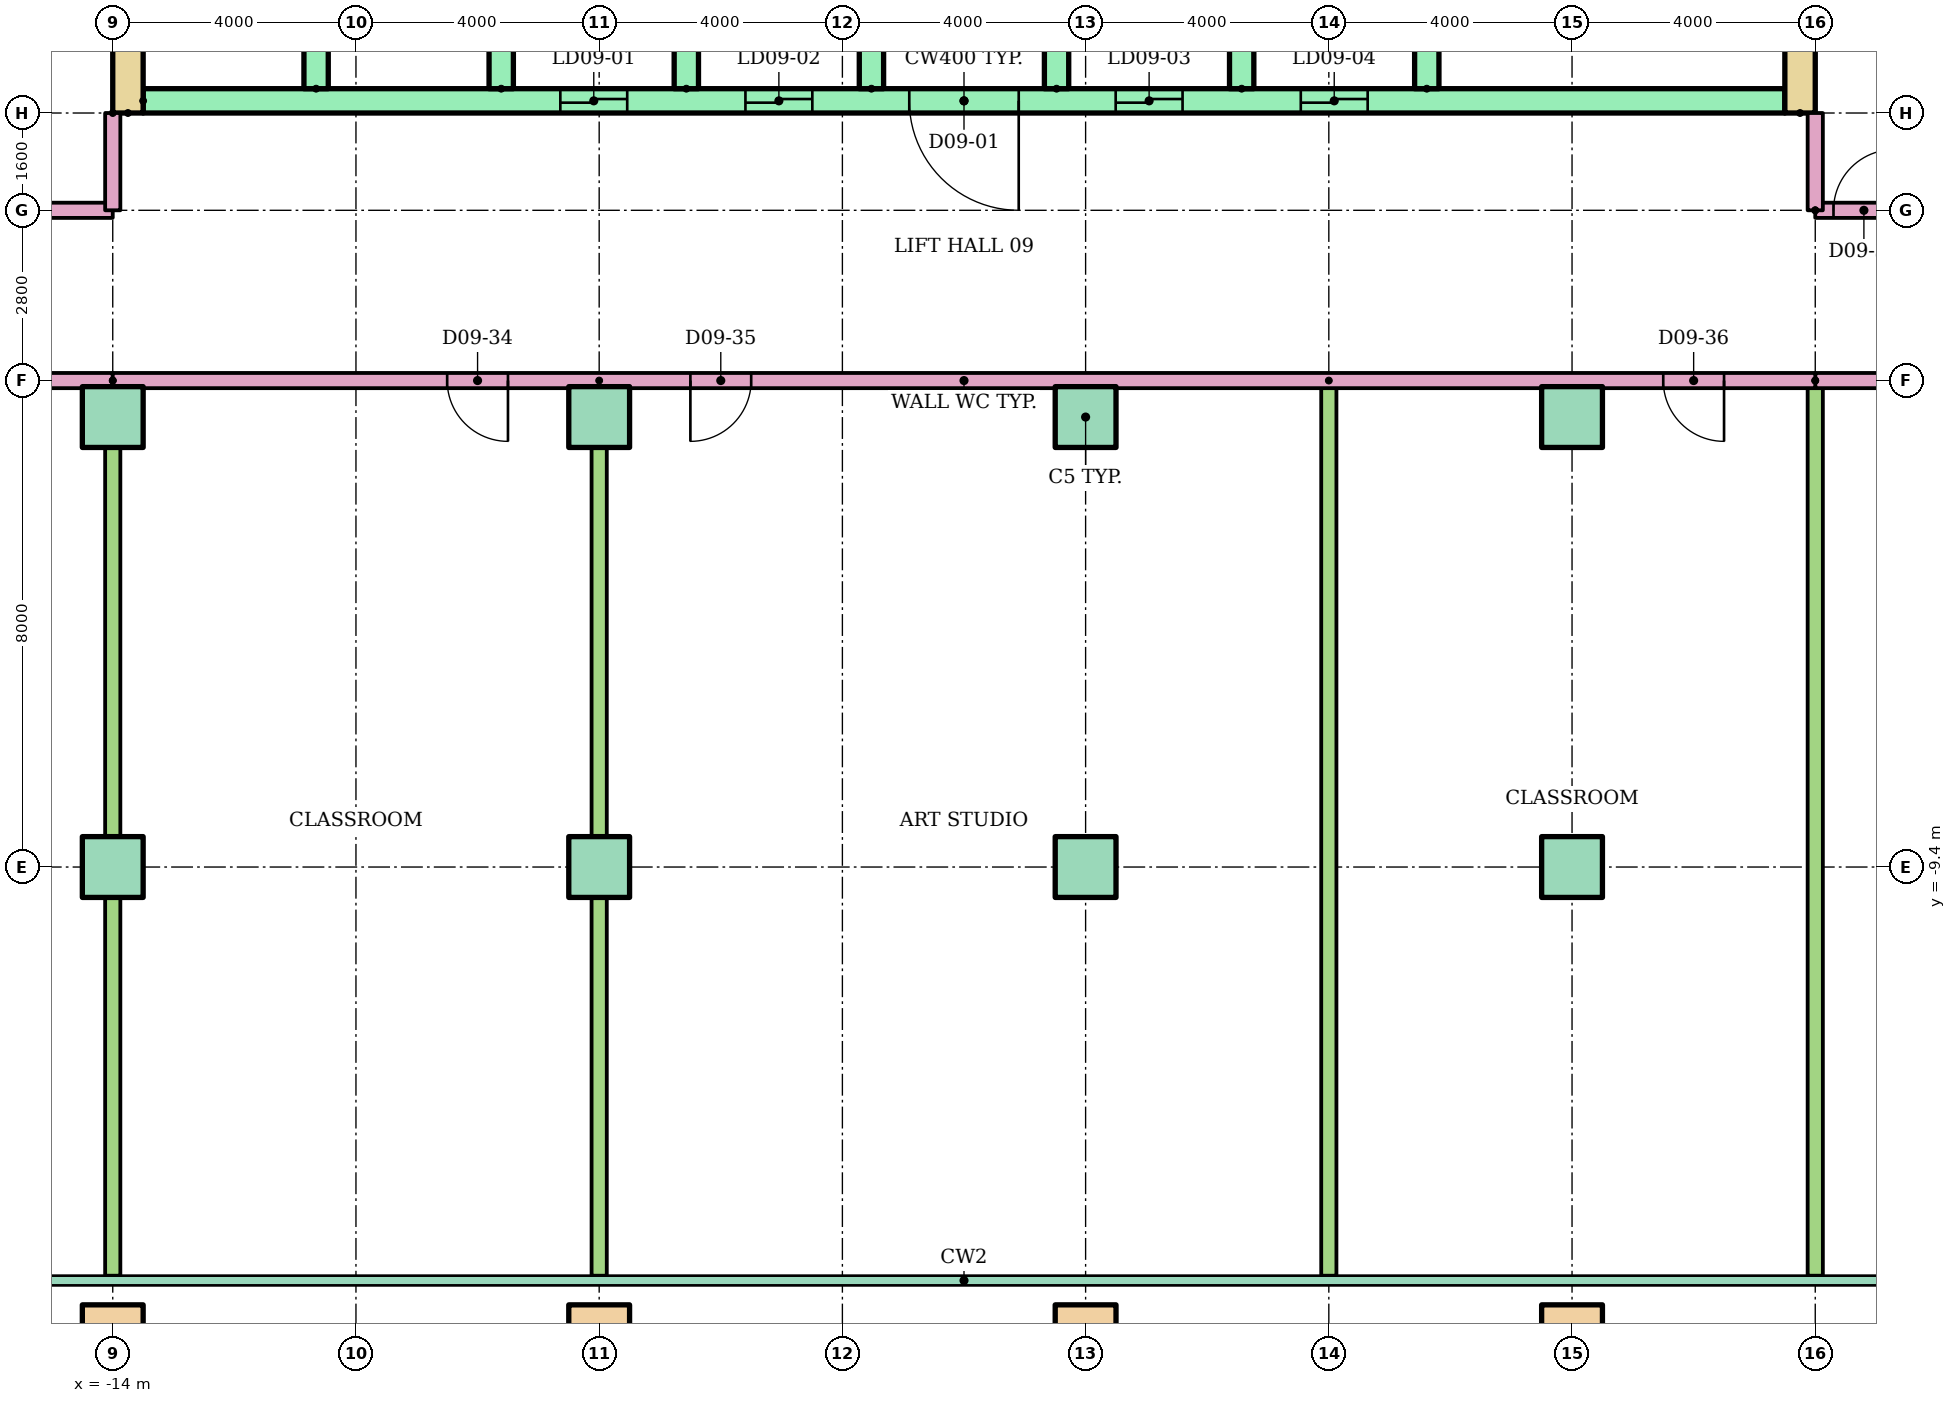
"""IFC4 building model, lengths in metres.
Left out: names, types, materials, properties, quantities, classifications, styles, units other than length and angle.
Written with IfcOpenShell. Run it as: python <this file> out.ifc"""

import sys

from ifc_helpers import new_model, si_unit, direction, frame, frame_2d, origin, origin_2d, place, context, subcontext, project, spatial, rectangle, hollow_rectangle, extrude, element, fill, save


model = new_model("IFC4")
c1 = context("Model", 3, precision=1e-05, world=origin(), true_north=direction((0.0, 1.0)))
c2 = subcontext(c1, "Body", "Model", "MODEL_VIEW")
j1 = project(units=[si_unit("LENGTHUNIT", "METRE"), si_unit("PLANEANGLEUNIT", "RADIAN")], contexts=[c1])
p1 = place(None, origin())
s1 = spatial("IfcSite", under=j1, at=p1, CompositionType="ELEMENT")
p2 = place(p1, origin())
s2 = spatial("IfcBuilding", under=s1, at=p2, CompositionType="ELEMENT")
p3 = place(p2, frame((0.0, 0.0, 37.7)))
s3 = spatial("IfcBuildingStorey", under=s2, at=p3, CompositionType="ELEMENT", Elevation=37.7)
for number, where in (
    (1, (-14.0, -17.1, 0.0)),
    (2, (-6.0, -17.1, 0.0)),
    (3, (2.0, -17.1, 0.0)),
    (4, (10.0, -17.1, 0.0)),
):
    element("IfcColumn", number, at=place(p3, frame(where)), inside=s3, PredefinedType="COLUMN", context=c2, shape_type="SweptSolid", body=[
        extrude(hollow_rectangle(XDim=1.0, YDim=1.0, WallThickness=0.05, at=origin_2d()), origin(), (0.0, 0.0, 1.0), 3.9),
    ])
for number, where in (
    (5, (-14.0, -9.4, 0.0)),
    (6, (-6.0, -9.4, 0.0)),
    (7, (2.0, -9.4, 0.0)),
    (8, (10.0, -9.4, 0.0)),
    (9, (-14.0, -2.0, 0.0)),
    (10, (-6.0, -2.0, 0.0)),
    (11, (2.0, -2.0, 0.0)),
    (12, (10.0, -2.0, 0.0)),
):
    element("IfcColumn", number, at=place(p3, frame(where)), inside=s3, PredefinedType="COLUMN", context=c2, shape_type="SweptSolid", body=[
        extrude(rectangle(XDim=1.0, YDim=1.0, at=origin_2d()), origin(), (0.0, 0.0, 1.0), 3.9),
    ])
for number, where, z_axis, x_axis in (
    (13, (-13.75, 3.0, 0.0), (0.0, 0.0, 1.0), (0.0, 1.0, 0.0)),
    (14, (13.75, 3.0, 0.0), (0.0, 0.0, 1.0), (0.0, 1.0, 0.0)),
):
    element("IfcWall", number, at=place(p3, frame(where, z_axis=z_axis, x_axis=x_axis)), inside=s3, PredefinedType="SHEAR", context=c2, shape_type="SweptSolid", body=[
        extrude(rectangle(XDim=17.0, YDim=0.5, at=frame_2d((8.5, 0.0))), origin(), (0.0, 0.0, 1.0), 3.62),
    ])
p4 = place(p3, frame((-13.5, 3.2, 0.0)))
e15 = element("IfcWall", 15, at=p4, inside=s3, PredefinedType="SHEAR", context=c2, shape_type="SweptSolid", body=[
    extrude(rectangle(XDim=27.0, YDim=0.4, at=frame_2d((13.5, 0.0))), origin(), (0.0, 0.0, 1.0), 3.62),
])
p5 = place(p4, frame((6.861, 0.0, 0.0)))
e16 = element("IfcOpeningElement", 16, at=p5, cuts=e15, PredefinedType="OPENING", context=c2, shape_type="SweptSolid", body=[
    extrude(rectangle(XDim=1.1, YDim=2.1, at=frame_2d((0.55, 1.05))), frame((0.0, 0.21, 0.0), z_axis=(0.0, -1.0, 0.0), x_axis=(1.0, 0.0, 0.0)), (0.0, 0.0, 1.0), 0.42),
])
p6 = place(p4, frame((9.906, 0.0, 0.0)))
e17 = element("IfcOpeningElement", 17, at=p6, cuts=e15, PredefinedType="OPENING", context=c2, shape_type="SweptSolid", body=[
    extrude(rectangle(XDim=1.1, YDim=2.1, at=frame_2d((0.55, 1.05))), frame((0.0, 0.21, 0.0), z_axis=(0.0, -1.0, 0.0), x_axis=(1.0, 0.0, 0.0)), (0.0, 0.0, 1.0), 0.42),
])
p7 = place(p4, frame((15.994, 0.0, 0.0)))
e18 = element("IfcOpeningElement", 18, at=p7, cuts=e15, PredefinedType="OPENING", context=c2, shape_type="SweptSolid", body=[
    extrude(rectangle(XDim=1.1, YDim=2.1, at=frame_2d((0.55, 1.05))), frame((0.0, 0.21, 0.0), z_axis=(0.0, -1.0, 0.0), x_axis=(1.0, 0.0, 0.0)), (0.0, 0.0, 1.0), 0.42),
])
p8 = place(p4, frame((19.039, 0.0, 0.0)))
e19 = element("IfcOpeningElement", 19, at=p8, cuts=e15, PredefinedType="OPENING", context=c2, shape_type="SweptSolid", body=[
    extrude(rectangle(XDim=1.1, YDim=2.1, at=frame_2d((0.55, 1.05))), frame((0.0, 0.21, 0.0), z_axis=(0.0, -1.0, 0.0), x_axis=(1.0, 0.0, 0.0)), (0.0, 0.0, 1.0), 0.42),
])
p9 = place(p4, frame((12.6, 0.0, 0.0)))
e20 = element("IfcOpeningElement", 20, at=p9, cuts=e15, PredefinedType="OPENING", context=c2, shape_type="SweptSolid", body=[
    extrude(rectangle(XDim=1.8, YDim=2.1, at=frame_2d((0.9, 1.05))), frame((0.0, 0.21, 0.0), z_axis=(0.0, -1.0, 0.0), x_axis=(1.0, 0.0, 0.0)), (0.0, 0.0, 1.0), 0.42),
])
for number, where, z_axis, x_axis in (
    (21, (-10.656, 3.4, 0.0), (0.0, 0.0, 1.0), (0.0, 1.0, 0.0)),
    (22, (-7.611, 3.4, 0.0), (0.0, 0.0, 1.0), (0.0, 1.0, 0.0)),
    (23, (-4.567, 3.4, 0.0), (0.0, 0.0, 1.0), (0.0, 1.0, 0.0)),
    (24, (-1.522, 3.4, 0.0), (0.0, 0.0, 1.0), (0.0, 1.0, 0.0)),
    (25, (1.522, 3.4, 0.0), (0.0, 0.0, 1.0), (0.0, 1.0, 0.0)),
    (26, (4.567, 3.4, 0.0), (0.0, 0.0, 1.0), (0.0, 1.0, 0.0)),
    (27, (7.611, 3.4, 0.0), (0.0, 0.0, 1.0), (0.0, 1.0, 0.0)),
):
    element("IfcWall", number, at=place(p3, frame(where, z_axis=z_axis, x_axis=x_axis)), inside=s3, PredefinedType="SHEAR", context=c2, shape_type="SweptSolid", body=[
        extrude(rectangle(XDim=3.0, YDim=0.4, at=frame_2d((1.5, 0.0))), origin(), (0.0, 0.0, 1.0), 3.62),
    ])
p10 = place(p3, frame((-14.0, -1.4, 0.0), z_axis=(0.0, 0.0, 1.0), x_axis=(-1.0, 0.0, 0.0)))
e28 = element("IfcWall", 28, at=p10, inside=s3, PredefinedType="PARTITIONING", context=c2, shape_type="SweptSolid", body=[
    extrude(rectangle(XDim=15.0, YDim=0.25, at=frame_2d((7.5, 0.0))), origin(), (0.0, 0.0, 1.0), 3.1),
])
p11 = place(p10, frame((1.5, 0.0, 0.0)))
e29 = element("IfcOpeningElement", 29, at=p11, cuts=e28, PredefinedType="OPENING", context=c2, shape_type="SweptSolid", body=[
    extrude(rectangle(XDim=1.0, YDim=2.1, at=frame_2d((0.5, 1.05))), frame((0.0, 0.135, 0.0), z_axis=(0.0, -1.0, 0.0), x_axis=(1.0, 0.0, 0.0)), (0.0, 0.0, 1.0), 0.27),
])
p12 = place(p10, frame((8.555, 0.0, 0.0)))
e30 = element("IfcOpeningElement", 30, at=p12, cuts=e28, PredefinedType="OPENING", context=c2, shape_type="SweptSolid", body=[
    extrude(rectangle(XDim=0.9, YDim=2.1, at=frame_2d((0.45, 1.05))), frame((0.0, 0.135, 0.0), z_axis=(0.0, -1.0, 0.0), x_axis=(1.0, 0.0, 0.0)), (0.0, 0.0, 1.0), 0.27),
])
p13 = place(p10, frame((13.5, 0.0, 0.0)))
e31 = element("IfcOpeningElement", 31, at=p13, cuts=e28, PredefinedType="OPENING", context=c2, shape_type="SweptSolid", body=[
    extrude(rectangle(XDim=1.0, YDim=2.1, at=frame_2d((0.5, 1.05))), frame((0.0, 0.135, 0.0), z_axis=(0.0, -1.0, 0.0), x_axis=(1.0, 0.0, 0.0)), (0.0, 0.0, 1.0), 0.27),
])
p14 = place(p3, frame((-14.0, -1.4, 0.0), z_axis=(0.0, 0.0, 1.0), x_axis=(0.0, -1.0, 0.0)))
e32 = element("IfcWall", 32, at=p14, inside=s3, PredefinedType="PARTITIONING", context=c2, shape_type="SweptSolid", body=[
    extrude(rectangle(XDim=14.721, YDim=0.25, at=frame_2d((7.361, 0.0))), origin(), (0.0, 0.0, 1.0), 3.1),
])
p15 = place(p3, frame((-29.0, 1.4, 0.0)))
e33 = element("IfcWall", 33, at=p15, inside=s3, PredefinedType="PARTITIONING", context=c2, shape_type="SweptSolid", body=[
    extrude(rectangle(XDim=15.0, YDim=0.25, at=frame_2d((7.5, 0.0))), origin(), (0.0, 0.0, 1.0), 3.1),
])
p16 = place(p15, frame((12.5, 0.0, 0.0)))
e34 = element("IfcOpeningElement", 34, at=p16, cuts=e33, PredefinedType="OPENING", context=c2, shape_type="SweptSolid", body=[
    extrude(rectangle(XDim=1.0, YDim=2.1, at=frame_2d((0.5, 1.05))), frame((0.0, 0.135, 0.0), z_axis=(0.0, -1.0, 0.0), x_axis=(1.0, 0.0, 0.0)), (0.0, 0.0, 1.0), 0.27),
])
p17 = place(p15, frame((4.5, 0.0, 0.0)))
e35 = element("IfcOpeningElement", 35, at=p17, cuts=e33, PredefinedType="OPENING", context=c2, shape_type="SweptSolid", body=[
    extrude(rectangle(XDim=1.0, YDim=2.1, at=frame_2d((0.5, 1.05))), frame((0.0, 0.135, 0.0), z_axis=(0.0, -1.0, 0.0), x_axis=(1.0, 0.0, 0.0)), (0.0, 0.0, 1.0), 0.27),
])
p18 = place(p3, frame((29.0, -1.4, 0.0), z_axis=(0.0, 0.0, 1.0), x_axis=(-1.0, 0.0, 0.0)))
e36 = element("IfcWall", 36, at=p18, inside=s3, PredefinedType="PARTITIONING", context=c2, shape_type="SweptSolid", body=[
    extrude(rectangle(XDim=15.0, YDim=0.25, at=frame_2d((7.5, 0.0))), origin(), (0.0, 0.0, 1.0), 3.1),
])
p19 = place(p18, frame((12.5, 0.0, 0.0)))
e37 = element("IfcOpeningElement", 37, at=p19, cuts=e36, PredefinedType="OPENING", context=c2, shape_type="SweptSolid", body=[
    extrude(rectangle(XDim=1.0, YDim=2.1, at=frame_2d((0.5, 1.05))), frame((0.0, 0.135, 0.0), z_axis=(0.0, -1.0, 0.0), x_axis=(1.0, 0.0, 0.0)), (0.0, 0.0, 1.0), 0.27),
])
p20 = place(p18, frame((0.5, 0.0, 0.0)))
e38 = element("IfcOpeningElement", 38, at=p20, cuts=e36, PredefinedType="OPENING", context=c2, shape_type="SweptSolid", body=[
    extrude(rectangle(XDim=1.0, YDim=2.1, at=frame_2d((0.5, 1.05))), frame((0.0, 0.135, 0.0), z_axis=(0.0, -1.0, 0.0), x_axis=(1.0, 0.0, 0.0)), (0.0, 0.0, 1.0), 0.27),
])
p21 = place(p3, frame((14.0, -1.4, 0.0), z_axis=(0.0, 0.0, 1.0), x_axis=(0.0, -1.0, 0.0)))
e39 = element("IfcWall", 39, at=p21, inside=s3, PredefinedType="PARTITIONING", context=c2, shape_type="SweptSolid", body=[
    extrude(rectangle(XDim=14.721, YDim=0.25, at=frame_2d((7.361, 0.0))), origin(), (0.0, 0.0, 1.0), 3.1),
])
p22 = place(p3, frame((14.0, 1.4, 0.0)))
e40 = element("IfcWall", 40, at=p22, inside=s3, PredefinedType="PARTITIONING", context=c2, shape_type="SweptSolid", body=[
    extrude(rectangle(XDim=15.0, YDim=0.25, at=frame_2d((7.5, 0.0))), origin(), (0.0, 0.0, 1.0), 3.1),
])
p23 = place(p22, frame((0.3, 0.0, 0.0)))
e41 = element("IfcOpeningElement", 41, at=p23, cuts=e40, PredefinedType="OPENING", context=c2, shape_type="SweptSolid", body=[
    extrude(rectangle(XDim=1.0, YDim=2.1, at=frame_2d((0.5, 1.05))), frame((0.0, 0.135, 0.0), z_axis=(0.0, -1.0, 0.0), x_axis=(1.0, 0.0, 0.0)), (0.0, 0.0, 1.0), 0.27),
])
p24 = place(p22, frame((9.5, 0.0, 0.0)))
e42 = element("IfcOpeningElement", 42, at=p24, cuts=e40, PredefinedType="OPENING", context=c2, shape_type="SweptSolid", body=[
    extrude(rectangle(XDim=1.0, YDim=2.1, at=frame_2d((0.5, 1.05))), frame((0.0, 0.135, 0.0), z_axis=(0.0, -1.0, 0.0), x_axis=(1.0, 0.0, 0.0)), (0.0, 0.0, 1.0), 0.27),
])
p25 = place(p22, frame((13.5, 0.0, 0.0)))
e43 = element("IfcOpeningElement", 43, at=p25, cuts=e40, PredefinedType="OPENING", context=c2, shape_type="SweptSolid", body=[
    extrude(rectangle(XDim=1.0, YDim=2.1, at=frame_2d((0.5, 1.05))), frame((0.0, 0.135, 0.0), z_axis=(0.0, -1.0, 0.0), x_axis=(1.0, 0.0, 0.0)), (0.0, 0.0, 1.0), 0.27),
])
for number, where, z_axis, x_axis in (
    (44, (-6.0, -1.4, 0.0), (0.0, 0.0, 1.0), (0.0, -1.0, 0.0)),
    (45, (6.0, -1.4, 0.0), (0.0, 0.0, 1.0), (0.0, -1.0, 0.0)),
):
    element("IfcWall", number, at=place(p3, frame(where, z_axis=z_axis, x_axis=x_axis)), inside=s3, PredefinedType="PARTITIONING", context=c2, shape_type="SweptSolid", body=[
        extrude(rectangle(XDim=14.721, YDim=0.25, at=frame_2d((7.361, 0.0))), origin(), (0.0, 0.0, 1.0), 3.1),
    ])
p26 = place(p3, frame((14.0, -1.4, 0.0), z_axis=(0.0, 0.0, 1.0), x_axis=(-1.0, 0.0, 0.0)))
e46 = element("IfcWall", 46, at=p26, inside=s3, PredefinedType="PARTITIONING", context=c2, shape_type="SweptSolid", body=[
    extrude(rectangle(XDim=28.0, YDim=0.25, at=frame_2d((14.0, 0.0))), origin(), (0.0, 0.0, 1.0), 3.1),
])
p27 = place(p26, frame((21.5, 0.0, 0.0)))
e47 = element("IfcOpeningElement", 47, at=p27, cuts=e46, PredefinedType="OPENING", context=c2, shape_type="SweptSolid", body=[
    extrude(rectangle(XDim=1.0, YDim=2.1, at=frame_2d((0.5, 1.05))), frame((0.0, 0.135, 0.0), z_axis=(0.0, -1.0, 0.0), x_axis=(1.0, 0.0, 0.0)), (0.0, 0.0, 1.0), 0.27),
])
p28 = place(p26, frame((17.5, 0.0, 0.0)))
e48 = element("IfcOpeningElement", 48, at=p28, cuts=e46, PredefinedType="OPENING", context=c2, shape_type="SweptSolid", body=[
    extrude(rectangle(XDim=1.0, YDim=2.1, at=frame_2d((0.5, 1.05))), frame((0.0, 0.135, 0.0), z_axis=(0.0, -1.0, 0.0), x_axis=(1.0, 0.0, 0.0)), (0.0, 0.0, 1.0), 0.27),
])
p29 = place(p26, frame((1.5, 0.0, 0.0)))
e49 = element("IfcOpeningElement", 49, at=p29, cuts=e46, PredefinedType="OPENING", context=c2, shape_type="SweptSolid", body=[
    extrude(rectangle(XDim=1.0, YDim=2.1, at=frame_2d((0.5, 1.05))), frame((0.0, 0.135, 0.0), z_axis=(0.0, -1.0, 0.0), x_axis=(1.0, 0.0, 0.0)), (0.0, 0.0, 1.0), 0.27),
])
for number, where, z_axis, x_axis in (
    (50, (-14.0, 3.0, 0.0), (0.0, 0.0, 1.0), (0.0, -1.0, 0.0)),
    (51, (14.0, 1.4, 0.0), (0.0, 0.0, 1.0), (0.0, 1.0, 0.0)),
):
    element("IfcWall", number, at=place(p3, frame(where, z_axis=z_axis, x_axis=x_axis)), inside=s3, PredefinedType="PARTITIONING", context=c2, shape_type="SweptSolid", body=[
        extrude(rectangle(XDim=1.6, YDim=0.25, at=frame_2d((0.8, 0.0))), origin(), (0.0, 0.0, 1.0), 3.1),
    ])
p30 = place(p5, origin())
e52 = element("IfcDoor", 52, at=p30, inside=s3, OperationType="SLIDING_TO_LEFT", PredefinedType="DOOR", context=c2, shape_type="SweptSolid", body=[
    extrude(rectangle(XDim=1.1, YDim=2.1, at=frame_2d((0.55, 1.05))), frame((0.0, 0.025, 0.0), z_axis=(0.0, -1.0, 0.0), x_axis=(1.0, 0.0, 0.0)), (0.0, 0.0, 1.0), 0.05),
])
fill(e16, e52)
p31 = place(p6, origin())
e53 = element("IfcDoor", 53, at=p31, inside=s3, OperationType="SLIDING_TO_LEFT", PredefinedType="DOOR", context=c2, shape_type="SweptSolid", body=[
    extrude(rectangle(XDim=1.1, YDim=2.1, at=frame_2d((0.55, 1.05))), frame((0.0, 0.025, 0.0), z_axis=(0.0, -1.0, 0.0), x_axis=(1.0, 0.0, 0.0)), (0.0, 0.0, 1.0), 0.05),
])
fill(e17, e53)
p32 = place(p7, origin())
e54 = element("IfcDoor", 54, at=p32, inside=s3, OperationType="SLIDING_TO_LEFT", PredefinedType="DOOR", context=c2, shape_type="SweptSolid", body=[
    extrude(rectangle(XDim=1.1, YDim=2.1, at=frame_2d((0.55, 1.05))), frame((0.0, 0.025, 0.0), z_axis=(0.0, -1.0, 0.0), x_axis=(1.0, 0.0, 0.0)), (0.0, 0.0, 1.0), 0.05),
])
fill(e18, e54)
p33 = place(p8, origin())
e55 = element("IfcDoor", 55, at=p33, inside=s3, OperationType="SLIDING_TO_LEFT", PredefinedType="DOOR", context=c2, shape_type="SweptSolid", body=[
    extrude(rectangle(XDim=1.1, YDim=2.1, at=frame_2d((0.55, 1.05))), frame((0.0, 0.025, 0.0), z_axis=(0.0, -1.0, 0.0), x_axis=(1.0, 0.0, 0.0)), (0.0, 0.0, 1.0), 0.05),
])
fill(e19, e55)
p34 = place(p9, frame((1.8, 0.0, 0.0), z_axis=(0.0, 0.0, 1.0), x_axis=(-1.0, 0.0, 0.0)))
e56 = element("IfcDoor", 56, at=p34, inside=s3, OperationType="DOUBLE_DOOR_SINGLE_SWING", PredefinedType="DOOR", context=c2, shape_type="SweptSolid", body=[
    extrude(rectangle(XDim=1.8, YDim=2.1, at=frame_2d((0.9, 1.05))), frame((0.0, 0.025, 0.0), z_axis=(0.0, -1.0, 0.0), x_axis=(1.0, 0.0, 0.0)), (0.0, 0.0, 1.0), 0.05),
])
fill(e20, e56)
p35 = place(p23, origin())
e57 = element("IfcDoor", 57, at=p35, inside=s3, OperationType="SINGLE_SWING_RIGHT", PredefinedType="DOOR", context=c2, shape_type="SweptSolid", body=[
    extrude(rectangle(XDim=1.0, YDim=2.1, at=frame_2d((0.5, 1.05))), frame((0.0, 0.025, 0.0), z_axis=(0.0, -1.0, 0.0), x_axis=(1.0, 0.0, 0.0)), (0.0, 0.0, 1.0), 0.05),
])
fill(e41, e57)
p36 = place(p27, origin())
e58 = element("IfcDoor", 58, at=p36, inside=s3, OperationType="SINGLE_SWING_LEFT", PredefinedType="DOOR", context=c2, shape_type="SweptSolid", body=[
    extrude(rectangle(XDim=1.0, YDim=2.1, at=frame_2d((0.5, 1.05))), frame((0.0, 0.025, 0.0), z_axis=(0.0, -1.0, 0.0), x_axis=(1.0, 0.0, 0.0)), (0.0, 0.0, 1.0), 0.05),
])
fill(e47, e58)
p37 = place(p28, origin())
e59 = element("IfcDoor", 59, at=p37, inside=s3, OperationType="SINGLE_SWING_RIGHT", PredefinedType="DOOR", context=c2, shape_type="SweptSolid", body=[
    extrude(rectangle(XDim=1.0, YDim=2.1, at=frame_2d((0.5, 1.05))), frame((0.0, 0.025, 0.0), z_axis=(0.0, -1.0, 0.0), x_axis=(1.0, 0.0, 0.0)), (0.0, 0.0, 1.0), 0.05),
])
fill(e48, e59)
p38 = place(p29, origin())
e60 = element("IfcDoor", 60, at=p38, inside=s3, OperationType="SINGLE_SWING_LEFT", PredefinedType="DOOR", context=c2, shape_type="SweptSolid", body=[
    extrude(rectangle(XDim=1.0, YDim=2.1, at=frame_2d((0.5, 1.05))), frame((0.0, 0.025, 0.0), z_axis=(0.0, -1.0, 0.0), x_axis=(1.0, 0.0, 0.0)), (0.0, 0.0, 1.0), 0.05),
])
fill(e49, e60)
save(model, sys.argv[1])
